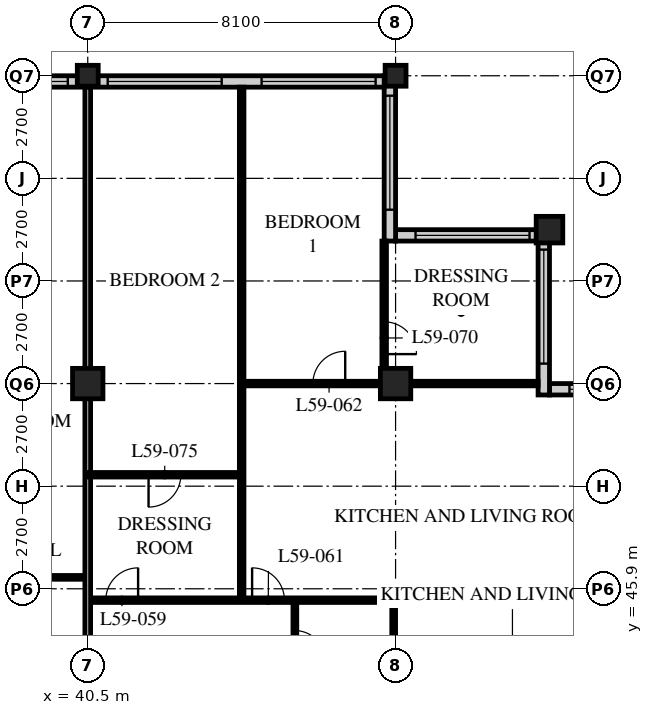
"""IFC4 building model, lengths in metres.
Left out: names, types, materials, properties, quantities, classifications, styles, units other than length and angle.
Written with IfcOpenShell. Run it as: python <this file> out.ifc"""

import sys

from ifc_helpers import new_model, si_unit, direction, frame, frame_2d, origin, origin_2d, place, context, subcontext, project, spatial, rectangle, hollow_rectangle, extrude, element, fill, save


model = new_model("IFC4")
c1 = context("Model", 3, precision=1e-05, world=origin(), true_north=direction((0.0, 1.0)))
c2 = subcontext(c1, "Body", "Model", "MODEL_VIEW")
j1 = project(units=[si_unit("LENGTHUNIT", "METRE"), si_unit("PLANEANGLEUNIT", "RADIAN")], contexts=[c1])
p1 = place(None, origin())
s1 = spatial("IfcSite", under=j1, at=p1, CompositionType="ELEMENT")
p2 = place(p1, origin())
s2 = spatial("IfcBuilding", under=s1, at=p2, CompositionType="ELEMENT")
p3 = place(p2, frame((0.0, 0.0, 228.0)))
s3 = spatial("IfcBuildingStorey", under=s2, at=p3, CompositionType="ELEMENT", Elevation=228.0)
p4 = place(p3, frame((40.5, 51.3, 0.0), z_axis=(0.0, 0.0, 1.0), x_axis=(1.0, 0.0, 0.0)))
e1 = element("IfcColumn", 1, at=p4, inside=s3, PredefinedType="COLUMN", context=c2, shape_type="SweptSolid", body=[
    extrude(hollow_rectangle(XDim=0.8, YDim=0.8, WallThickness=0.08, at=origin_2d()), origin(), (0.0, 0.0, 1.0), 3.6),
])
p5 = place(p3, frame((40.5, 59.4, 0.0), z_axis=(0.0, 0.0, 1.0), x_axis=(1.0, 0.0, 0.0)))
e2 = element("IfcColumn", 2, at=p5, inside=s3, PredefinedType="COLUMN", context=c2, shape_type="SweptSolid", body=[
    extrude(hollow_rectangle(XDim=0.55, YDim=0.55, WallThickness=0.045, at=origin_2d()), origin(), (0.0, 0.0, 1.0), 3.6),
])
p6 = place(p3, frame((48.6, 51.3, 0.0), z_axis=(0.0, 0.0, 1.0), x_axis=(1.0, 0.0, 0.0)))
e3 = element("IfcColumn", 3, at=p6, inside=s3, PredefinedType="COLUMN", context=c2, shape_type="SweptSolid", body=[
    extrude(hollow_rectangle(XDim=0.8, YDim=0.8, WallThickness=0.08, at=origin_2d()), origin(), (0.0, 0.0, 1.0), 3.6),
])
p7 = place(p3, frame((48.6, 59.4, 0.0), z_axis=(0.0, 0.0, 1.0), x_axis=(1.0, 0.0, 0.0)))
e4 = element("IfcColumn", 4, at=p7, inside=s3, PredefinedType="COLUMN", context=c2, shape_type="SweptSolid", body=[
    extrude(hollow_rectangle(XDim=0.55, YDim=0.55, WallThickness=0.045, at=origin_2d()), origin(), (0.0, 0.0, 1.0), 3.6),
])
p8 = place(p3, frame((52.65, 55.35, 0.0), z_axis=(0.0, 0.0, 1.0), x_axis=(1.0, 0.0, 0.0)))
e5 = element("IfcColumn", 5, at=p8, inside=s3, PredefinedType="COLUMN", context=c2, shape_type="SweptSolid", body=[
    extrude(hollow_rectangle(XDim=0.7, YDim=0.7, WallThickness=0.07, at=origin_2d()), origin(), (0.0, 0.0, 1.0), 3.6),
])
p9 = place(p3, frame((56.4, 51.15, 0.0), z_axis=(0.0, 0.0, 1.0), x_axis=(-1.0, 0.0, 0.0)))
e6 = element("IfcWall", 6, at=p9, inside=s3, PredefinedType="SOLIDWALL", context=c2, shape_type="SweptSolid", body=[
    extrude(rectangle(XDim=3.75, YDim=0.3, at=frame_2d((1.875, 0.0))), origin(), (0.0, 0.0, 1.0), 3.39),
])
p10 = place(p9, frame((0.225, 0.0, 0.6)))
e7 = element("IfcOpeningElement", 7, at=p10, cuts=e6, PredefinedType="OPENING", context=c2, shape_type="SweptSolid", body=[
    extrude(rectangle(XDim=3.0, YDim=2.0, at=frame_2d((1.5, 1.0))), frame((0.0, 0.16, 0.0), z_axis=(0.0, -1.0, 0.0), x_axis=(1.0, 0.0, 0.0)), (0.0, 0.0, 1.0), 0.32),
])
p11 = place(p3, frame((52.5, 51.0, 0.0), z_axis=(0.0, 0.0, 1.0), x_axis=(0.0, 1.0, 0.0)))
e8 = element("IfcWall", 8, at=p11, inside=s3, PredefinedType="SOLIDWALL", context=c2, shape_type="SweptSolid", body=[
    extrude(rectangle(XDim=4.35, YDim=0.3, at=frame_2d((2.175, 0.0))), origin(), (0.0, 0.0, 1.0), 3.39),
])
p12 = place(p11, frame((0.825, 0.0, 0.6)))
e9 = element("IfcOpeningElement", 9, at=p12, cuts=e8, PredefinedType="OPENING", context=c2, shape_type="SweptSolid", body=[
    extrude(rectangle(XDim=3.0, YDim=2.0, at=frame_2d((1.5, 1.0))), frame((0.0, 0.16, 0.0), z_axis=(0.0, -1.0, 0.0), x_axis=(1.0, 0.0, 0.0)), (0.0, 0.0, 1.0), 0.32),
])
p13 = place(p3, frame((52.35, 55.2, 0.0), z_axis=(0.0, 0.0, 1.0), x_axis=(-1.0, 0.0, 0.0)))
e10 = element("IfcWall", 10, at=p13, inside=s3, PredefinedType="SOLIDWALL", context=c2, shape_type="SweptSolid", body=[
    extrude(rectangle(XDim=3.75, YDim=0.3, at=frame_2d((1.875, 0.0))), origin(), (0.0, 0.0, 1.0), 3.39),
])
p14 = place(p13, frame((0.225, 0.0, 0.6)))
e11 = element("IfcOpeningElement", 11, at=p14, cuts=e10, PredefinedType="OPENING", context=c2, shape_type="SweptSolid", body=[
    extrude(rectangle(XDim=3.0, YDim=2.0, at=frame_2d((1.5, 1.0))), frame((0.0, 0.16, 0.0), z_axis=(0.0, -1.0, 0.0), x_axis=(1.0, 0.0, 0.0)), (0.0, 0.0, 1.0), 0.32),
])
p15 = place(p3, frame((48.45, 55.05, 0.0), z_axis=(0.0, 0.0, 1.0), x_axis=(0.0, 1.0, 0.0)))
e12 = element("IfcWall", 12, at=p15, inside=s3, PredefinedType="SOLIDWALL", context=c2, shape_type="SweptSolid", body=[
    extrude(rectangle(XDim=4.35, YDim=0.3, at=frame_2d((2.175, 0.0))), origin(), (0.0, 0.0, 1.0), 3.39),
])
p16 = place(p15, frame((0.825, 0.0, 0.6)))
e13 = element("IfcOpeningElement", 13, at=p16, cuts=e12, PredefinedType="OPENING", context=c2, shape_type="SweptSolid", body=[
    extrude(rectangle(XDim=3.0, YDim=2.0, at=frame_2d((1.5, 1.0))), frame((0.0, 0.16, 0.0), z_axis=(0.0, -1.0, 0.0), x_axis=(1.0, 0.0, 0.0)), (0.0, 0.0, 1.0), 0.32),
])
p17 = place(p3, frame((48.3, 59.25, 0.0), z_axis=(0.0, 0.0, 1.0), x_axis=(-1.0, 0.0, 0.0)))
e14 = element("IfcWall", 14, at=p17, inside=s3, PredefinedType="SOLIDWALL", context=c2, shape_type="SweptSolid", body=[
    extrude(rectangle(XDim=40.2, YDim=0.3, at=frame_2d((20.1, 0.0))), origin(), (0.0, 0.0, 1.0), 3.39),
])
p18 = place(p17, frame((0.225, 0.0, 0.6)))
e15 = element("IfcOpeningElement", 15, at=p18, cuts=e14, PredefinedType="OPENING", context=c2, shape_type="SweptSolid", body=[
    extrude(rectangle(XDim=3.0, YDim=2.0, at=frame_2d((1.5, 1.0))), frame((0.0, 0.16, 0.0), z_axis=(0.0, -1.0, 0.0), x_axis=(1.0, 0.0, 0.0)), (0.0, 0.0, 1.0), 0.32),
])
p19 = place(p17, frame((4.275, 0.0, 0.6)))
e16 = element("IfcOpeningElement", 16, at=p19, cuts=e14, PredefinedType="OPENING", context=c2, shape_type="SweptSolid", body=[
    extrude(rectangle(XDim=3.0, YDim=2.0, at=frame_2d((1.5, 1.0))), frame((0.0, 0.16, 0.0), z_axis=(0.0, -1.0, 0.0), x_axis=(1.0, 0.0, 0.0)), (0.0, 0.0, 1.0), 0.32),
])
p20 = place(p17, frame((8.325, 0.0, 0.6)))
e17 = element("IfcOpeningElement", 17, at=p20, cuts=e14, PredefinedType="OPENING", context=c2, shape_type="SweptSolid", body=[
    extrude(rectangle(XDim=3.0, YDim=2.0, at=frame_2d((1.5, 1.0))), frame((0.0, 0.16, 0.0), z_axis=(0.0, -1.0, 0.0), x_axis=(1.0, 0.0, 0.0)), (0.0, 0.0, 1.0), 0.32),
])
p21 = place(p17, frame((12.375, 0.0, 0.6)))
e18 = element("IfcOpeningElement", 18, at=p21, cuts=e14, PredefinedType="OPENING", context=c2, shape_type="SweptSolid", body=[
    extrude(rectangle(XDim=3.0, YDim=2.0, at=frame_2d((1.5, 1.0))), frame((0.0, 0.16, 0.0), z_axis=(0.0, -1.0, 0.0), x_axis=(1.0, 0.0, 0.0)), (0.0, 0.0, 1.0), 0.32),
])
p22 = place(p17, frame((16.425, 0.0, 0.6)))
e19 = element("IfcOpeningElement", 19, at=p22, cuts=e14, PredefinedType="OPENING", context=c2, shape_type="SweptSolid", body=[
    extrude(rectangle(XDim=3.0, YDim=2.0, at=frame_2d((1.5, 1.0))), frame((0.0, 0.16, 0.0), z_axis=(0.0, -1.0, 0.0), x_axis=(1.0, 0.0, 0.0)), (0.0, 0.0, 1.0), 0.32),
])
p23 = place(p17, frame((20.475, 0.0, 0.6)))
e20 = element("IfcOpeningElement", 20, at=p23, cuts=e14, PredefinedType="OPENING", context=c2, shape_type="SweptSolid", body=[
    extrude(rectangle(XDim=3.0, YDim=2.0, at=frame_2d((1.5, 1.0))), frame((0.0, 0.16, 0.0), z_axis=(0.0, -1.0, 0.0), x_axis=(1.0, 0.0, 0.0)), (0.0, 0.0, 1.0), 0.32),
])
p24 = place(p17, frame((24.525, 0.0, 0.6)))
e21 = element("IfcOpeningElement", 21, at=p24, cuts=e14, PredefinedType="OPENING", context=c2, shape_type="SweptSolid", body=[
    extrude(rectangle(XDim=3.0, YDim=2.0, at=frame_2d((1.5, 1.0))), frame((0.0, 0.16, 0.0), z_axis=(0.0, -1.0, 0.0), x_axis=(1.0, 0.0, 0.0)), (0.0, 0.0, 1.0), 0.32),
])
p25 = place(p17, frame((28.575, 0.0, 0.6)))
e22 = element("IfcOpeningElement", 22, at=p25, cuts=e14, PredefinedType="OPENING", context=c2, shape_type="SweptSolid", body=[
    extrude(rectangle(XDim=3.0, YDim=2.0, at=frame_2d((1.5, 1.0))), frame((0.0, 0.16, 0.0), z_axis=(0.0, -1.0, 0.0), x_axis=(1.0, 0.0, 0.0)), (0.0, 0.0, 1.0), 0.32),
])
p26 = place(p17, frame((32.625, 0.0, 0.6)))
e23 = element("IfcOpeningElement", 23, at=p26, cuts=e14, PredefinedType="OPENING", context=c2, shape_type="SweptSolid", body=[
    extrude(rectangle(XDim=3.0, YDim=2.0, at=frame_2d((1.5, 1.0))), frame((0.0, 0.16, 0.0), z_axis=(0.0, -1.0, 0.0), x_axis=(1.0, 0.0, 0.0)), (0.0, 0.0, 1.0), 0.32),
])
p27 = place(p17, frame((36.675, 0.0, 0.6)))
e24 = element("IfcOpeningElement", 24, at=p27, cuts=e14, PredefinedType="OPENING", context=c2, shape_type="SweptSolid", body=[
    extrude(rectangle(XDim=3.0, YDim=2.0, at=frame_2d((1.5, 1.0))), frame((0.0, 0.16, 0.0), z_axis=(0.0, -1.0, 0.0), x_axis=(1.0, 0.0, 0.0)), (0.0, 0.0, 1.0), 0.32),
])
p28 = place(p3, frame((38.3, 46.2, 0.0), z_axis=(0.0, 0.0, 1.0), x_axis=(1.0, 0.0, 0.0)))
e25 = element("IfcWall", 25, at=p28, inside=s3, PredefinedType="PARTITIONING", context=c2, shape_type="SweptSolid", body=[
    extrude(rectangle(XDim=2.2, YDim=0.1, at=frame_2d((1.1, 0.0))), origin(), (0.0, 0.0, 1.0), 3.39),
])
p29 = place(p3, frame((40.5, 45.6, 0.0), z_axis=(0.0, 0.0, 1.0), x_axis=(1.0, 0.0, 0.0)))
e26 = element("IfcWall", 26, at=p29, inside=s3, PredefinedType="PARTITIONING", context=c2, shape_type="SweptSolid", body=[
    extrude(rectangle(XDim=8.05, YDim=0.12, at=frame_2d((4.025, 0.0))), origin(), (0.0, 0.0, 1.0), 3.39),
])
p30 = place(p29, frame((0.475, 0.0, 0.0)))
e27 = element("IfcOpeningElement", 27, at=p30, cuts=e26, PredefinedType="OPENING", context=c2, shape_type="SweptSolid", body=[
    extrude(rectangle(XDim=0.85, YDim=2.1, at=frame_2d((0.425, 1.05))), frame((0.0, 0.07, 0.0), z_axis=(0.0, -1.0, 0.0), x_axis=(1.0, 0.0, 0.0)), (0.0, 0.0, 1.0), 0.14),
])
p31 = place(p29, frame((4.325, 0.0, 0.0)))
e28 = element("IfcOpeningElement", 28, at=p31, cuts=e26, PredefinedType="OPENING", context=c2, shape_type="SweptSolid", body=[
    extrude(rectangle(XDim=0.85, YDim=2.1, at=frame_2d((0.425, 1.05))), frame((0.0, 0.07, 0.0), z_axis=(0.0, -1.0, 0.0), x_axis=(1.0, 0.0, 0.0)), (0.0, 0.0, 1.0), 0.14),
])
p32 = place(p3, frame((45.95, 43.2, 0.0), z_axis=(0.0, 0.0, 1.0), x_axis=(0.0, 1.0, 0.0)))
e29 = element("IfcWall", 29, at=p32, inside=s3, PredefinedType="PARTITIONING", context=c2, shape_type="SweptSolid", body=[
    extrude(rectangle(XDim=2.4, YDim=0.1, at=frame_2d((1.2, 0.0))), origin(), (0.0, 0.0, 1.0), 3.39),
])
p33 = place(p32, frame((0.8, 0.0, 0.0)))
e30 = element("IfcOpeningElement", 30, at=p33, cuts=e29, PredefinedType="OPENING", context=c2, shape_type="SweptSolid", body=[
    extrude(rectangle(XDim=0.8, YDim=2.1, at=frame_2d((0.4, 1.05))), frame((0.0, 0.06, 0.0), z_axis=(0.0, -1.0, 0.0), x_axis=(1.0, 0.0, 0.0)), (0.0, 0.0, 1.0), 0.12),
])
p34 = place(p3, frame((48.55, 43.2, 0.0), z_axis=(0.0, 0.0, 1.0), x_axis=(0.0, 1.0, 0.0)))
e31 = element("IfcWall", 31, at=p34, inside=s3, PredefinedType="PARTITIONING", context=c2, shape_type="SweptSolid", body=[
    extrude(rectangle(XDim=2.4, YDim=0.1, at=frame_2d((1.2, 0.0))), origin(), (0.0, 0.0, 1.0), 2.628),
])
p35 = place(p3, frame((44.55, 45.6, 0.0), z_axis=(0.0, 0.0, 1.0), x_axis=(0.0, 1.0, 0.0)))
e32 = element("IfcWall", 32, at=p35, inside=s3, PredefinedType="PARTITIONING", context=c2, shape_type="SweptSolid", body=[
    extrude(rectangle(XDim=13.5, YDim=0.12, at=frame_2d((6.75, 0.0))), origin(), (0.0, 0.0, 1.0), 3.39),
])
p36 = place(p3, frame((44.55, 51.3, 0.0), z_axis=(0.0, 0.0, 1.0), x_axis=(1.0, 0.0, 0.0)))
e33 = element("IfcWall", 33, at=p36, inside=s3, PredefinedType="PARTITIONING", context=c2, shape_type="SweptSolid", body=[
    extrude(rectangle(XDim=7.8, YDim=0.12, at=frame_2d((3.9, 0.0))), origin(), (0.0, 0.0, 1.0), 2.628),
])
p37 = place(p36, frame((1.875, 0.0, 0.0)))
e34 = element("IfcOpeningElement", 34, at=p37, cuts=e33, PredefinedType="OPENING", context=c2, shape_type="SweptSolid", body=[
    extrude(rectangle(XDim=0.85, YDim=2.1, at=frame_2d((0.425, 1.05))), frame((0.0, 0.07, 0.0), z_axis=(0.0, -1.0, 0.0), x_axis=(1.0, 0.0, 0.0)), (0.0, 0.0, 1.0), 0.14),
])
p38 = place(p3, frame((40.5, 43.2, 0.0), z_axis=(0.0, 0.0, 1.0), x_axis=(0.0, 1.0, 0.0)))
e35 = element("IfcWall", 35, at=p38, inside=s3, PredefinedType="PARTITIONING", context=c2, shape_type="SweptSolid", body=[
    extrude(rectangle(XDim=15.9, YDim=0.15, at=frame_2d((7.95, 0.0))), origin(), (0.0, 0.0, 1.0), 2.628),
])
p39 = place(p3, frame((48.3, 51.3, 0.0), z_axis=(0.0, 0.0, 1.0), x_axis=(0.0, 1.0, 0.0)))
e36 = element("IfcWall", 36, at=p39, inside=s3, PredefinedType="PARTITIONING", context=c2, shape_type="SweptSolid", body=[
    extrude(rectangle(XDim=3.75, YDim=0.12, at=frame_2d((1.875, 0.0))), origin(), (0.0, 0.0, 1.0), 3.39),
])
p40 = place(p39, frame((0.775, 0.0, 0.0)))
e37 = element("IfcOpeningElement", 37, at=p40, cuts=e36, PredefinedType="OPENING", context=c2, shape_type="SweptSolid", body=[
    extrude(rectangle(XDim=0.85, YDim=2.1, at=frame_2d((0.425, 1.05))), frame((0.0, 0.07, 0.0), z_axis=(0.0, -1.0, 0.0), x_axis=(1.0, 0.0, 0.0)), (0.0, 0.0, 1.0), 0.14),
])
p41 = place(p3, frame((40.5, 48.9, 0.0), z_axis=(0.0, 0.0, 1.0), x_axis=(1.0, 0.0, 0.0)))
e38 = element("IfcWall", 38, at=p41, inside=s3, PredefinedType="PARTITIONING", context=c2, shape_type="SweptSolid", body=[
    extrude(rectangle(XDim=4.05, YDim=0.12, at=frame_2d((2.025, 0.0))), origin(), (0.0, 0.0, 1.0), 3.39),
])
p42 = place(p41, frame((1.6, 0.0, 0.0)))
e39 = element("IfcOpeningElement", 39, at=p42, cuts=e38, PredefinedType="OPENING", context=c2, shape_type="SweptSolid", body=[
    extrude(rectangle(XDim=0.85, YDim=2.1, at=frame_2d((0.425, 1.05))), frame((0.0, 0.07, 0.0), z_axis=(0.0, -1.0, 0.0), x_axis=(1.0, 0.0, 0.0)), (0.0, 0.0, 1.0), 0.14),
])
p43 = place(p10, origin())
e40 = element("IfcWindow", 40, at=p43, inside=s3, PartitioningType="SINGLE_PANEL", PredefinedType="WINDOW", context=c2, shape_type="SweptSolid", body=[
    extrude(rectangle(XDim=3.0, YDim=2.0, at=frame_2d((1.5, 1.0))), frame((0.0, 0.03, 0.0), z_axis=(0.0, -1.0, 0.0), x_axis=(1.0, 0.0, 0.0)), (0.0, 0.0, 1.0), 0.06),
])
fill(e7, e40)
p44 = place(p12, origin())
e41 = element("IfcWindow", 41, at=p44, inside=s3, PartitioningType="SINGLE_PANEL", PredefinedType="WINDOW", context=c2, shape_type="SweptSolid", body=[
    extrude(rectangle(XDim=3.0, YDim=2.0, at=frame_2d((1.5, 1.0))), frame((0.0, 0.03, 0.0), z_axis=(0.0, -1.0, 0.0), x_axis=(1.0, 0.0, 0.0)), (0.0, 0.0, 1.0), 0.06),
])
fill(e9, e41)
p45 = place(p14, origin())
e42 = element("IfcWindow", 42, at=p45, inside=s3, PartitioningType="SINGLE_PANEL", PredefinedType="WINDOW", context=c2, shape_type="SweptSolid", body=[
    extrude(rectangle(XDim=3.0, YDim=2.0, at=frame_2d((1.5, 1.0))), frame((0.0, 0.03, 0.0), z_axis=(0.0, -1.0, 0.0), x_axis=(1.0, 0.0, 0.0)), (0.0, 0.0, 1.0), 0.06),
])
fill(e11, e42)
p46 = place(p16, origin())
e43 = element("IfcWindow", 43, at=p46, inside=s3, PartitioningType="SINGLE_PANEL", PredefinedType="WINDOW", context=c2, shape_type="SweptSolid", body=[
    extrude(rectangle(XDim=3.0, YDim=2.0, at=frame_2d((1.5, 1.0))), frame((0.0, 0.03, 0.0), z_axis=(0.0, -1.0, 0.0), x_axis=(1.0, 0.0, 0.0)), (0.0, 0.0, 1.0), 0.06),
])
fill(e13, e43)
p47 = place(p18, origin())
e44 = element("IfcWindow", 44, at=p47, inside=s3, PartitioningType="SINGLE_PANEL", PredefinedType="WINDOW", context=c2, shape_type="SweptSolid", body=[
    extrude(rectangle(XDim=3.0, YDim=2.0, at=frame_2d((1.5, 1.0))), frame((0.0, 0.03, 0.0), z_axis=(0.0, -1.0, 0.0), x_axis=(1.0, 0.0, 0.0)), (0.0, 0.0, 1.0), 0.06),
])
fill(e15, e44)
p48 = place(p19, origin())
e45 = element("IfcWindow", 45, at=p48, inside=s3, PartitioningType="SINGLE_PANEL", PredefinedType="WINDOW", context=c2, shape_type="SweptSolid", body=[
    extrude(rectangle(XDim=3.0, YDim=2.0, at=frame_2d((1.5, 1.0))), frame((0.0, 0.03, 0.0), z_axis=(0.0, -1.0, 0.0), x_axis=(1.0, 0.0, 0.0)), (0.0, 0.0, 1.0), 0.06),
])
fill(e16, e45)
p49 = place(p20, origin())
e46 = element("IfcWindow", 46, at=p49, inside=s3, PartitioningType="SINGLE_PANEL", PredefinedType="WINDOW", context=c2, shape_type="SweptSolid", body=[
    extrude(rectangle(XDim=3.0, YDim=2.0, at=frame_2d((1.5, 1.0))), frame((0.0, 0.03, 0.0), z_axis=(0.0, -1.0, 0.0), x_axis=(1.0, 0.0, 0.0)), (0.0, 0.0, 1.0), 0.06),
])
fill(e17, e46)
p50 = place(p30, origin())
e47 = element("IfcDoor", 47, at=p50, inside=s3, OperationType="SINGLE_SWING_RIGHT", PredefinedType="DOOR", context=c2, shape_type="SweptSolid", body=[
    extrude(rectangle(XDim=0.85, YDim=2.1, at=frame_2d((0.425, 1.05))), frame((0.0, 0.025, 0.0), z_axis=(0.0, -1.0, 0.0), x_axis=(1.0, 0.0, 0.0)), (0.0, 0.0, 1.0), 0.05),
])
fill(e27, e47)
p51 = place(p33, origin())
e48 = element("IfcDoor", 48, at=p51, inside=s3, OperationType="SINGLE_SWING_RIGHT", PredefinedType="DOOR", context=c2, shape_type="SweptSolid", body=[
    extrude(rectangle(XDim=0.8, YDim=2.1, at=frame_2d((0.4, 1.05))), frame((0.0, 0.025, 0.0), z_axis=(0.0, -1.0, 0.0), x_axis=(1.0, 0.0, 0.0)), (0.0, 0.0, 1.0), 0.05),
])
fill(e30, e48)
p52 = place(p31, origin())
e49 = element("IfcDoor", 49, at=p52, inside=s3, OperationType="SINGLE_SWING_LEFT", PredefinedType="DOOR", context=c2, shape_type="SweptSolid", body=[
    extrude(rectangle(XDim=0.85, YDim=2.1, at=frame_2d((0.425, 1.05))), frame((0.0, 0.025, 0.0), z_axis=(0.0, -1.0, 0.0), x_axis=(1.0, 0.0, 0.0)), (0.0, 0.0, 1.0), 0.05),
])
fill(e28, e49)
p53 = place(p37, origin())
e50 = element("IfcDoor", 50, at=p53, inside=s3, OperationType="SINGLE_SWING_RIGHT", PredefinedType="DOOR", context=c2, shape_type="SweptSolid", body=[
    extrude(rectangle(XDim=0.85, YDim=2.1, at=frame_2d((0.425, 1.05))), frame((0.0, 0.025, 0.0), z_axis=(0.0, -1.0, 0.0), x_axis=(1.0, 0.0, 0.0)), (0.0, 0.0, 1.0), 0.05),
])
fill(e34, e50)
p54 = place(p40, origin())
e51 = element("IfcDoor", 51, at=p54, inside=s3, OperationType="SINGLE_SWING_RIGHT", PredefinedType="DOOR", context=c2, shape_type="SweptSolid", body=[
    extrude(rectangle(XDim=0.85, YDim=2.1, at=frame_2d((0.425, 1.05))), frame((0.0, 0.025, 0.0), z_axis=(0.0, -1.0, 0.0), x_axis=(1.0, 0.0, 0.0)), (0.0, 0.0, 1.0), 0.05),
])
fill(e37, e51)
p55 = place(p42, origin())
e52 = element("IfcDoor", 52, at=p55, inside=s3, OperationType="SINGLE_SWING_RIGHT", PredefinedType="DOOR", context=c2, shape_type="SweptSolid", body=[
    extrude(rectangle(XDim=0.85, YDim=2.1, at=frame_2d((0.425, 1.05))), frame((0.0, 0.025, 0.0), z_axis=(0.0, -1.0, 0.0), x_axis=(1.0, 0.0, 0.0)), (0.0, 0.0, 1.0), 0.05),
])
fill(e39, e52)
save(model, sys.argv[1])
